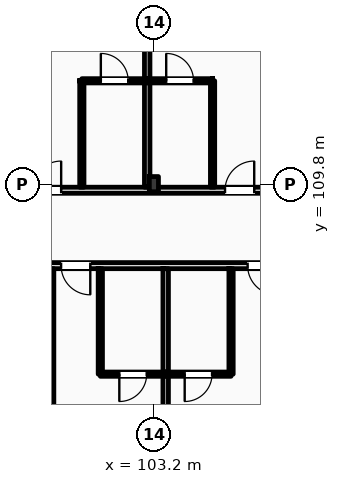
"""IFC4 building model, lengths in metres.
Left out: names, types, materials, properties, quantities, classifications, styles, units other than length and angle.
Written with IfcOpenShell. Run it as: python <this file> out.ifc"""

import sys

from ifc_helpers import new_model, si_unit, direction, frame, frame_2d, origin, origin_2d, place, context, subcontext, project, spatial, rectangle, i_section, extrude, element, fill, save


model = new_model("IFC4")
c1 = context("Model", 3, precision=1e-05, world=origin(), true_north=direction((0.0, 1.0)))
c2 = subcontext(c1, "Body", "Model", "MODEL_VIEW")
j1 = project(units=[si_unit("LENGTHUNIT", "METRE"), si_unit("PLANEANGLEUNIT", "RADIAN")], contexts=[c1])
p1 = place(None, origin())
s1 = spatial("IfcSite", under=j1, at=p1, CompositionType="ELEMENT")
p2 = place(p1, origin())
s2 = spatial("IfcBuilding", under=s1, at=p2, CompositionType="ELEMENT")
p3 = place(p2, frame((0.0, 0.0, 24.6)))
s3 = spatial("IfcBuildingStorey", under=s2, at=p3, CompositionType="ELEMENT", Elevation=24.6)
p4 = place(p3, frame((103.2, 109.8, 0.0), z_axis=(0.0, 0.0, 1.0), x_axis=(1.0, 0.0, 0.0)))
e1 = element("IfcColumn", 1, at=p4, inside=s3, PredefinedType="COLUMN", context=c2, shape_type="SweptSolid", body=[
    extrude(i_section(OverallWidth=0.3, OverallDepth=0.5, WebThickness=0.014, FlangeThickness=0.028, FilletRadius=0.027, at=origin_2d()), origin(), (0.0, 0.0, 1.0), 3.6),
])
p5 = place(p3, frame((10.65, 109.6, 0.0), z_axis=(0.0, 0.0, 1.0), x_axis=(1.0, 0.0, 0.0)))
e2 = element("IfcWall", 2, at=p5, inside=s3, PredefinedType="PARTITIONING", context=c2, shape_type="SweptSolid", body=[
    extrude(rectangle(XDim=109.21, YDim=0.2, at=frame_2d((54.605, 0.0))), origin(), (0.0, 0.0, 1.0), 2.78),
])
p6 = place(p5, frame((12.705, 0.0, 0.0)))
e3 = element("IfcOpeningElement", 3, at=p6, cuts=e2, PredefinedType="OPENING", context=c2, shape_type="SweptSolid", body=[
    extrude(rectangle(XDim=1.02, YDim=2.2, at=frame_2d((0.51, 1.1))), frame((0.0, 0.11, 0.0), z_axis=(0.0, -1.0, 0.0), x_axis=(1.0, 0.0, 0.0)), (0.0, 0.0, 1.0), 0.22),
])
p7 = place(p5, frame((19.26, 0.0, 0.0)))
e4 = element("IfcOpeningElement", 4, at=p7, cuts=e2, PredefinedType="OPENING", context=c2, shape_type="SweptSolid", body=[
    extrude(rectangle(XDim=1.02, YDim=2.2, at=frame_2d((0.51, 1.1))), frame((0.0, 0.11, 0.0), z_axis=(0.0, -1.0, 0.0), x_axis=(1.0, 0.0, 0.0)), (0.0, 0.0, 1.0), 0.22),
])
p8 = place(p5, frame((23.71, 0.0, 0.0)))
e5 = element("IfcOpeningElement", 5, at=p8, cuts=e2, PredefinedType="OPENING", context=c2, shape_type="SweptSolid", body=[
    extrude(rectangle(XDim=1.02, YDim=2.2, at=frame_2d((0.51, 1.1))), frame((0.0, 0.11, 0.0), z_axis=(0.0, -1.0, 0.0), x_axis=(1.0, 0.0, 0.0)), (0.0, 0.0, 1.0), 0.22),
])
p9 = place(p5, frame((27.66, 0.0, 0.0)))
e6 = element("IfcOpeningElement", 6, at=p9, cuts=e2, PredefinedType="OPENING", context=c2, shape_type="SweptSolid", body=[
    extrude(rectangle(XDim=1.02, YDim=2.2, at=frame_2d((0.51, 1.1))), frame((0.0, 0.11, 0.0), z_axis=(0.0, -1.0, 0.0), x_axis=(1.0, 0.0, 0.0)), (0.0, 0.0, 1.0), 0.22),
])
p10 = place(p5, frame((31.89, 0.0, 0.0)))
e7 = element("IfcOpeningElement", 7, at=p10, cuts=e2, PredefinedType="OPENING", context=c2, shape_type="SweptSolid", body=[
    extrude(rectangle(XDim=0.96, YDim=2.2, at=frame_2d((0.48, 1.1))), frame((0.0, 0.11, 0.0), z_axis=(0.0, -1.0, 0.0), x_axis=(1.0, 0.0, 0.0)), (0.0, 0.0, 1.0), 0.22),
])
p11 = place(p5, frame((33.94, 0.0, 0.0)))
e8 = element("IfcOpeningElement", 8, at=p11, cuts=e2, PredefinedType="OPENING", context=c2, shape_type="SweptSolid", body=[
    extrude(rectangle(XDim=0.96, YDim=2.2, at=frame_2d((0.48, 1.1))), frame((0.0, 0.11, 0.0), z_axis=(0.0, -1.0, 0.0), x_axis=(1.0, 0.0, 0.0)), (0.0, 0.0, 1.0), 0.22),
])
p12 = place(p5, frame((40.29, 0.0, 0.0)))
e9 = element("IfcOpeningElement", 9, at=p12, cuts=e2, PredefinedType="OPENING", context=c2, shape_type="SweptSolid", body=[
    extrude(rectangle(XDim=0.96, YDim=2.2, at=frame_2d((0.48, 1.1))), frame((0.0, 0.11, 0.0), z_axis=(0.0, -1.0, 0.0), x_axis=(1.0, 0.0, 0.0)), (0.0, 0.0, 1.0), 0.22),
])
p13 = place(p5, frame((42.34, 0.0, 0.0)))
e10 = element("IfcOpeningElement", 10, at=p13, cuts=e2, PredefinedType="OPENING", context=c2, shape_type="SweptSolid", body=[
    extrude(rectangle(XDim=0.96, YDim=2.2, at=frame_2d((0.48, 1.1))), frame((0.0, 0.11, 0.0), z_axis=(0.0, -1.0, 0.0), x_axis=(1.0, 0.0, 0.0)), (0.0, 0.0, 1.0), 0.22),
])
p14 = place(p5, frame((48.69, 0.0, 0.0)))
e11 = element("IfcOpeningElement", 11, at=p14, cuts=e2, PredefinedType="OPENING", context=c2, shape_type="SweptSolid", body=[
    extrude(rectangle(XDim=0.96, YDim=2.2, at=frame_2d((0.48, 1.1))), frame((0.0, 0.11, 0.0), z_axis=(0.0, -1.0, 0.0), x_axis=(1.0, 0.0, 0.0)), (0.0, 0.0, 1.0), 0.22),
])
p15 = place(p5, frame((50.74, 0.0, 0.0)))
e12 = element("IfcOpeningElement", 12, at=p15, cuts=e2, PredefinedType="OPENING", context=c2, shape_type="SweptSolid", body=[
    extrude(rectangle(XDim=0.96, YDim=2.2, at=frame_2d((0.48, 1.1))), frame((0.0, 0.11, 0.0), z_axis=(0.0, -1.0, 0.0), x_axis=(1.0, 0.0, 0.0)), (0.0, 0.0, 1.0), 0.22),
])
p16 = place(p5, frame((57.09, 0.0, 0.0)))
e13 = element("IfcOpeningElement", 13, at=p16, cuts=e2, PredefinedType="OPENING", context=c2, shape_type="SweptSolid", body=[
    extrude(rectangle(XDim=0.96, YDim=2.2, at=frame_2d((0.48, 1.1))), frame((0.0, 0.11, 0.0), z_axis=(0.0, -1.0, 0.0), x_axis=(1.0, 0.0, 0.0)), (0.0, 0.0, 1.0), 0.22),
])
p17 = place(p5, frame((59.14, 0.0, 0.0)))
e14 = element("IfcOpeningElement", 14, at=p17, cuts=e2, PredefinedType="OPENING", context=c2, shape_type="SweptSolid", body=[
    extrude(rectangle(XDim=0.96, YDim=2.2, at=frame_2d((0.48, 1.1))), frame((0.0, 0.11, 0.0), z_axis=(0.0, -1.0, 0.0), x_axis=(1.0, 0.0, 0.0)), (0.0, 0.0, 1.0), 0.22),
])
p18 = place(p5, frame((65.49, 0.0, 0.0)))
e15 = element("IfcOpeningElement", 15, at=p18, cuts=e2, PredefinedType="OPENING", context=c2, shape_type="SweptSolid", body=[
    extrude(rectangle(XDim=0.96, YDim=2.2, at=frame_2d((0.48, 1.1))), frame((0.0, 0.11, 0.0), z_axis=(0.0, -1.0, 0.0), x_axis=(1.0, 0.0, 0.0)), (0.0, 0.0, 1.0), 0.22),
])
p19 = place(p5, frame((67.54, 0.0, 0.0)))
e16 = element("IfcOpeningElement", 16, at=p19, cuts=e2, PredefinedType="OPENING", context=c2, shape_type="SweptSolid", body=[
    extrude(rectangle(XDim=0.96, YDim=2.2, at=frame_2d((0.48, 1.1))), frame((0.0, 0.11, 0.0), z_axis=(0.0, -1.0, 0.0), x_axis=(1.0, 0.0, 0.0)), (0.0, 0.0, 1.0), 0.22),
])
p20 = place(p5, frame((73.89, 0.0, 0.0)))
e17 = element("IfcOpeningElement", 17, at=p20, cuts=e2, PredefinedType="OPENING", context=c2, shape_type="SweptSolid", body=[
    extrude(rectangle(XDim=0.96, YDim=2.2, at=frame_2d((0.48, 1.1))), frame((0.0, 0.11, 0.0), z_axis=(0.0, -1.0, 0.0), x_axis=(1.0, 0.0, 0.0)), (0.0, 0.0, 1.0), 0.22),
])
p21 = place(p5, frame((78.09, 0.0, 0.0)))
e18 = element("IfcOpeningElement", 18, at=p21, cuts=e2, PredefinedType="OPENING", context=c2, shape_type="SweptSolid", body=[
    extrude(rectangle(XDim=0.96, YDim=2.2, at=frame_2d((0.48, 1.1))), frame((0.0, 0.11, 0.0), z_axis=(0.0, -1.0, 0.0), x_axis=(1.0, 0.0, 0.0)), (0.0, 0.0, 1.0), 0.22),
])
p22 = place(p5, frame((82.29, 0.0, 0.0)))
e19 = element("IfcOpeningElement", 19, at=p22, cuts=e2, PredefinedType="OPENING", context=c2, shape_type="SweptSolid", body=[
    extrude(rectangle(XDim=0.96, YDim=2.2, at=frame_2d((0.48, 1.1))), frame((0.0, 0.11, 0.0), z_axis=(0.0, -1.0, 0.0), x_axis=(1.0, 0.0, 0.0)), (0.0, 0.0, 1.0), 0.22),
])
p23 = place(p5, frame((86.49, 0.0, 0.0)))
e20 = element("IfcOpeningElement", 20, at=p23, cuts=e2, PredefinedType="OPENING", context=c2, shape_type="SweptSolid", body=[
    extrude(rectangle(XDim=0.96, YDim=2.2, at=frame_2d((0.48, 1.1))), frame((0.0, 0.11, 0.0), z_axis=(0.0, -1.0, 0.0), x_axis=(1.0, 0.0, 0.0)), (0.0, 0.0, 1.0), 0.22),
])
p24 = place(p5, frame((88.54, 0.0, 0.0)))
e21 = element("IfcOpeningElement", 21, at=p24, cuts=e2, PredefinedType="OPENING", context=c2, shape_type="SweptSolid", body=[
    extrude(rectangle(XDim=0.96, YDim=2.2, at=frame_2d((0.48, 1.1))), frame((0.0, 0.11, 0.0), z_axis=(0.0, -1.0, 0.0), x_axis=(1.0, 0.0, 0.0)), (0.0, 0.0, 1.0), 0.22),
])
p25 = place(p5, frame((94.89, 0.0, 0.0)))
e22 = element("IfcOpeningElement", 22, at=p25, cuts=e2, PredefinedType="OPENING", context=c2, shape_type="SweptSolid", body=[
    extrude(rectangle(XDim=0.96, YDim=2.2, at=frame_2d((0.48, 1.1))), frame((0.0, 0.11, 0.0), z_axis=(0.0, -1.0, 0.0), x_axis=(1.0, 0.0, 0.0)), (0.0, 0.0, 1.0), 0.22),
])
p26 = place(p5, frame((96.94, 0.0, 0.0)))
e23 = element("IfcOpeningElement", 23, at=p26, cuts=e2, PredefinedType="OPENING", context=c2, shape_type="SweptSolid", body=[
    extrude(rectangle(XDim=0.96, YDim=2.2, at=frame_2d((0.48, 1.1))), frame((0.0, 0.11, 0.0), z_axis=(0.0, -1.0, 0.0), x_axis=(1.0, 0.0, 0.0)), (0.0, 0.0, 1.0), 0.22),
])
p27 = place(p5, frame((103.29, 0.0, 0.0)))
e24 = element("IfcOpeningElement", 24, at=p27, cuts=e2, PredefinedType="OPENING", context=c2, shape_type="SweptSolid", body=[
    extrude(rectangle(XDim=0.96, YDim=2.2, at=frame_2d((0.48, 1.1))), frame((0.0, 0.11, 0.0), z_axis=(0.0, -1.0, 0.0), x_axis=(1.0, 0.0, 0.0)), (0.0, 0.0, 1.0), 0.22),
])
p28 = place(p5, frame((105.25, 0.0, 0.0)))
e25 = element("IfcOpeningElement", 25, at=p28, cuts=e2, PredefinedType="OPENING", context=c2, shape_type="SweptSolid", body=[
    extrude(rectangle(XDim=0.96, YDim=2.2, at=frame_2d((0.48, 1.1))), frame((0.0, 0.11, 0.0), z_axis=(0.0, -1.0, 0.0), x_axis=(1.0, 0.0, 0.0)), (0.0, 0.0, 1.0), 0.22),
])
p29 = place(p5, frame((2.716, 0.0, 0.0)))
e26 = element("IfcOpeningElement", 26, at=p29, cuts=e2, PredefinedType="OPENING", context=c2, shape_type="SweptSolid", body=[
    extrude(rectangle(XDim=1.35, YDim=2.25, at=frame_2d((0.675, 1.125))), frame((0.0, 0.11, 0.0), z_axis=(0.0, -1.0, 0.0), x_axis=(1.0, 0.0, 0.0)), (0.0, 0.0, 1.0), 0.22),
])
p30 = place(p5, frame((6.65, 0.0, 0.0)))
e27 = element("IfcOpeningElement", 27, at=p30, cuts=e2, PredefinedType="OPENING", context=c2, shape_type="SweptSolid", body=[
    extrude(rectangle(XDim=1.35, YDim=2.25, at=frame_2d((0.675, 1.125))), frame((0.0, 0.11, 0.0), z_axis=(0.0, -1.0, 0.0), x_axis=(1.0, 0.0, 0.0)), (0.0, 0.0, 1.0), 0.22),
])
p31 = place(p5, frame((10.583, 0.0, 0.0)))
e28 = element("IfcOpeningElement", 28, at=p31, cuts=e2, PredefinedType="OPENING", context=c2, shape_type="SweptSolid", body=[
    extrude(rectangle(XDim=1.35, YDim=2.25, at=frame_2d((0.675, 1.125))), frame((0.0, 0.11, 0.0), z_axis=(0.0, -1.0, 0.0), x_axis=(1.0, 0.0, 0.0)), (0.0, 0.0, 1.0), 0.22),
])
p32 = place(p3, frame((79.76, 107.12, 0.0), z_axis=(0.0, 0.0, 1.0), x_axis=(1.0, 0.0, 0.0)))
e29 = element("IfcWall", 29, at=p32, inside=s3, PredefinedType="PARTITIONING", context=c2, shape_type="SweptSolid", body=[
    extrude(rectangle(XDim=40.1, YDim=0.2, at=frame_2d((20.05, 0.0))), origin(), (0.0, 0.0, 1.0), 3.34),
])
p33 = place(p32, frame((2.65, 0.0, 0.0)))
e30 = element("IfcOpeningElement", 30, at=p33, cuts=e29, PredefinedType="OPENING", context=c2, shape_type="SweptSolid", body=[
    extrude(rectangle(XDim=0.96, YDim=2.2, at=frame_2d((0.48, 1.1))), frame((0.0, 0.11, 0.0), z_axis=(0.0, -1.0, 0.0), x_axis=(1.0, 0.0, 0.0)), (0.0, 0.0, 1.0), 0.22),
])
p34 = place(p32, frame((4.448, 0.0, 0.0)))
e31 = element("IfcOpeningElement", 31, at=p34, cuts=e29, PredefinedType="OPENING", context=c2, shape_type="SweptSolid", body=[
    extrude(rectangle(XDim=0.96, YDim=2.2, at=frame_2d((0.48, 1.1))), frame((0.0, 0.11, 0.0), z_axis=(0.0, -1.0, 0.0), x_axis=(1.0, 0.0, 0.0)), (0.0, 0.0, 1.0), 0.22),
])
p35 = place(p32, frame((10.583, 0.0, 0.0)))
e32 = element("IfcOpeningElement", 32, at=p35, cuts=e29, PredefinedType="OPENING", context=c2, shape_type="SweptSolid", body=[
    extrude(rectangle(XDim=0.96, YDim=2.2, at=frame_2d((0.48, 1.1))), frame((0.0, 0.11, 0.0), z_axis=(0.0, -1.0, 0.0), x_axis=(1.0, 0.0, 0.0)), (0.0, 0.0, 1.0), 0.22),
])
p36 = place(p32, frame((12.418, 0.0, 0.0)))
e33 = element("IfcOpeningElement", 33, at=p36, cuts=e29, PredefinedType="OPENING", context=c2, shape_type="SweptSolid", body=[
    extrude(rectangle(XDim=0.96, YDim=2.2, at=frame_2d((0.48, 1.1))), frame((0.0, 0.11, 0.0), z_axis=(0.0, -1.0, 0.0), x_axis=(1.0, 0.0, 0.0)), (0.0, 0.0, 1.0), 0.22),
])
p37 = place(p32, frame((18.553, 0.0, 0.0)))
e34 = element("IfcOpeningElement", 34, at=p37, cuts=e29, PredefinedType="OPENING", context=c2, shape_type="SweptSolid", body=[
    extrude(rectangle(XDim=0.96, YDim=2.2, at=frame_2d((0.48, 1.1))), frame((0.0, 0.11, 0.0), z_axis=(0.0, -1.0, 0.0), x_axis=(1.0, 0.0, 0.0)), (0.0, 0.0, 1.0), 0.22),
])
p38 = place(p32, frame((20.388, 0.0, 0.0)))
e35 = element("IfcOpeningElement", 35, at=p38, cuts=e29, PredefinedType="OPENING", context=c2, shape_type="SweptSolid", body=[
    extrude(rectangle(XDim=0.96, YDim=2.2, at=frame_2d((0.48, 1.1))), frame((0.0, 0.11, 0.0), z_axis=(0.0, -1.0, 0.0), x_axis=(1.0, 0.0, 0.0)), (0.0, 0.0, 1.0), 0.22),
])
p39 = place(p32, frame((26.523, 0.0, 0.0)))
e36 = element("IfcOpeningElement", 36, at=p39, cuts=e29, PredefinedType="OPENING", context=c2, shape_type="SweptSolid", body=[
    extrude(rectangle(XDim=0.96, YDim=2.2, at=frame_2d((0.48, 1.1))), frame((0.0, 0.11, 0.0), z_axis=(0.0, -1.0, 0.0), x_axis=(1.0, 0.0, 0.0)), (0.0, 0.0, 1.0), 0.22),
])
p40 = place(p32, frame((28.358, 0.0, 0.0)))
e37 = element("IfcOpeningElement", 37, at=p40, cuts=e29, PredefinedType="OPENING", context=c2, shape_type="SweptSolid", body=[
    extrude(rectangle(XDim=0.96, YDim=2.2, at=frame_2d((0.48, 1.1))), frame((0.0, 0.11, 0.0), z_axis=(0.0, -1.0, 0.0), x_axis=(1.0, 0.0, 0.0)), (0.0, 0.0, 1.0), 0.22),
])
p41 = place(p32, frame((34.493, 0.0, 0.0)))
e38 = element("IfcOpeningElement", 38, at=p41, cuts=e29, PredefinedType="OPENING", context=c2, shape_type="SweptSolid", body=[
    extrude(rectangle(XDim=0.96, YDim=2.2, at=frame_2d((0.48, 1.1))), frame((0.0, 0.11, 0.0), z_axis=(0.0, -1.0, 0.0), x_axis=(1.0, 0.0, 0.0)), (0.0, 0.0, 1.0), 0.22),
])
p42 = place(p32, frame((36.364, 0.0, 0.0)))
e39 = element("IfcOpeningElement", 39, at=p42, cuts=e29, PredefinedType="OPENING", context=c2, shape_type="SweptSolid", body=[
    extrude(rectangle(XDim=0.96, YDim=2.2, at=frame_2d((0.48, 1.1))), frame((0.0, 0.11, 0.0), z_axis=(0.0, -1.0, 0.0), x_axis=(1.0, 0.0, 0.0)), (0.0, 0.0, 1.0), 0.22),
])
p43 = place(p3, frame((102.98, 109.7, 0.0), z_axis=(0.0, 0.0, 1.0), x_axis=(0.0, 1.0, 0.0)))
e40 = element("IfcWall", 40, at=p43, inside=s3, PredefinedType="PARTITIONING", context=c2, shape_type="SweptSolid", body=[
    extrude(rectangle(XDim=8.15, YDim=0.18, at=frame_2d((4.075, 0.0))), origin(), (0.0, 0.0, 1.0), 2.93),
])
p44 = place(p3, frame((100.83, 109.7, 0.0), z_axis=(0.0, 0.0, 1.0), x_axis=(0.0, 1.0, 0.0)))
e41 = element("IfcWall", 41, at=p44, inside=s3, PredefinedType="PARTITIONING", context=c2, shape_type="SweptSolid", body=[
    extrude(rectangle(XDim=3.5, YDim=0.14, at=frame_2d((1.75, 0.0))), origin(), (0.0, 0.0, 1.0), 3.34),
])
p45 = place(p3, frame((100.83, 113.2, 0.0), z_axis=(0.0, 0.0, 1.0), x_axis=(1.0, 0.0, 0.0)))
e42 = element("IfcWall", 42, at=p45, inside=s3, PredefinedType="PARTITIONING", context=c2, shape_type="SweptSolid", body=[
    extrude(rectangle(XDim=2.15, YDim=0.14, at=frame_2d((1.075, 0.0))), origin(), (0.0, 0.0, 1.0), 3.34),
])
p46 = place(p45, frame((0.625, 0.0, 0.0)))
e43 = element("IfcOpeningElement", 43, at=p46, cuts=e42, PredefinedType="OPENING", context=c2, shape_type="SweptSolid", body=[
    extrude(rectangle(XDim=0.9, YDim=2.1, at=frame_2d((0.45, 1.05))), frame((0.0, 0.08, 0.0), z_axis=(0.0, -1.0, 0.0), x_axis=(1.0, 0.0, 0.0)), (0.0, 0.0, 1.0), 0.16),
])
p47 = place(p3, frame((105.13, 109.7, 0.0), z_axis=(0.0, 0.0, 1.0), x_axis=(0.0, 1.0, 0.0)))
e44 = element("IfcWall", 44, at=p47, inside=s3, PredefinedType="PARTITIONING", context=c2, shape_type="SweptSolid", body=[
    extrude(rectangle(XDim=3.5, YDim=0.14, at=frame_2d((1.75, 0.0))), origin(), (0.0, 0.0, 1.0), 3.34),
])
p48 = place(p3, frame((102.98, 113.2, 0.0), z_axis=(0.0, 0.0, 1.0), x_axis=(1.0, 0.0, 0.0)))
e45 = element("IfcWall", 45, at=p48, inside=s3, PredefinedType="PARTITIONING", context=c2, shape_type="SweptSolid", body=[
    extrude(rectangle(XDim=2.15, YDim=0.14, at=frame_2d((1.075, 0.0))), origin(), (0.0, 0.0, 1.0), 3.34),
])
p49 = place(p48, frame((0.625, 0.0, 0.0)))
e46 = element("IfcOpeningElement", 46, at=p49, cuts=e45, PredefinedType="OPENING", context=c2, shape_type="SweptSolid", body=[
    extrude(rectangle(XDim=0.9, YDim=2.1, at=frame_2d((0.45, 1.05))), frame((0.0, 0.08, 0.0), z_axis=(0.0, -1.0, 0.0), x_axis=(1.0, 0.0, 0.0)), (0.0, 0.0, 1.0), 0.16),
])
for number, where, z_axis, x_axis in (
    (47, (99.819, 96.14, 0.0), (0.0, 0.0, 1.0), (0.0, 1.0, 0.0)),
    (48, (103.588, 96.14, 0.0), (0.0, 0.0, 1.0), (0.0, 1.0, 0.0)),
):
    element("IfcWall", number, at=place(p3, frame(where, z_axis=z_axis, x_axis=x_axis)), inside=s3, PredefinedType="PARTITIONING", context=c2, shape_type="SweptSolid", body=[
        extrude(rectangle(XDim=10.88, YDim=0.18, at=frame_2d((5.44, 0.0))), origin(), (0.0, 0.0, 1.0), 3.34),
    ])
p50 = place(p3, frame((101.438, 103.55, 0.0), z_axis=(0.0, 0.0, 1.0), x_axis=(0.0, 1.0, 0.0)))
e49 = element("IfcWall", 49, at=p50, inside=s3, PredefinedType="PARTITIONING", context=c2, shape_type="SweptSolid", body=[
    extrude(rectangle(XDim=3.47, YDim=0.14, at=frame_2d((1.735, 0.0))), origin(), (0.0, 0.0, 1.0), 3.34),
])
p51 = place(p3, frame((101.438, 103.55, 0.0), z_axis=(0.0, 0.0, 1.0), x_axis=(1.0, 0.0, 0.0)))
e50 = element("IfcWall", 50, at=p51, inside=s3, PredefinedType="PARTITIONING", context=c2, shape_type="SweptSolid", body=[
    extrude(rectangle(XDim=2.15, YDim=0.14, at=frame_2d((1.075, 0.0))), origin(), (0.0, 0.0, 1.0), 3.34),
])
p52 = place(p51, frame((0.625, 0.0, 0.0)))
e51 = element("IfcOpeningElement", 51, at=p52, cuts=e50, PredefinedType="OPENING", context=c2, shape_type="SweptSolid", body=[
    extrude(rectangle(XDim=0.9, YDim=2.1, at=frame_2d((0.45, 1.05))), frame((0.0, 0.08, 0.0), z_axis=(0.0, -1.0, 0.0), x_axis=(1.0, 0.0, 0.0)), (0.0, 0.0, 1.0), 0.16),
])
p53 = place(p3, frame((105.738, 103.55, 0.0), z_axis=(0.0, 0.0, 1.0), x_axis=(0.0, 1.0, 0.0)))
e52 = element("IfcWall", 52, at=p53, inside=s3, PredefinedType="PARTITIONING", context=c2, shape_type="SweptSolid", body=[
    extrude(rectangle(XDim=3.47, YDim=0.14, at=frame_2d((1.735, 0.0))), origin(), (0.0, 0.0, 1.0), 3.34),
])
p54 = place(p3, frame((103.588, 103.55, 0.0), z_axis=(0.0, 0.0, 1.0), x_axis=(1.0, 0.0, 0.0)))
e53 = element("IfcWall", 53, at=p54, inside=s3, PredefinedType="PARTITIONING", context=c2, shape_type="SweptSolid", body=[
    extrude(rectangle(XDim=2.15, YDim=0.14, at=frame_2d((1.075, 0.0))), origin(), (0.0, 0.0, 1.0), 3.34),
])
p55 = place(p54, frame((0.625, 0.0, 0.0)))
e54 = element("IfcOpeningElement", 54, at=p55, cuts=e53, PredefinedType="OPENING", context=c2, shape_type="SweptSolid", body=[
    extrude(rectangle(XDim=0.9, YDim=2.1, at=frame_2d((0.45, 1.05))), frame((0.0, 0.08, 0.0), z_axis=(0.0, -1.0, 0.0), x_axis=(1.0, 0.0, 0.0)), (0.0, 0.0, 1.0), 0.16),
])
p56 = place(p24, origin())
e55 = element("IfcDoor", 55, at=p56, inside=s3, OperationType="SINGLE_SWING_RIGHT", PredefinedType="DOOR", context=c2, shape_type="SweptSolid", body=[
    extrude(rectangle(XDim=0.96, YDim=2.2, at=frame_2d((0.48, 1.1))), frame((0.0, 0.025, 0.0), z_axis=(0.0, -1.0, 0.0), x_axis=(1.0, 0.0, 0.0)), (0.0, 0.0, 1.0), 0.05),
])
fill(e21, e55)
p57 = place(p46, origin())
e56 = element("IfcDoor", 56, at=p57, inside=s3, OperationType="SINGLE_SWING_LEFT", PredefinedType="DOOR", context=c2, shape_type="SweptSolid", body=[
    extrude(rectangle(XDim=0.9, YDim=2.1, at=frame_2d((0.45, 1.05))), frame((0.0, 0.025, 0.0), z_axis=(0.0, -1.0, 0.0), x_axis=(1.0, 0.0, 0.0)), (0.0, 0.0, 1.0), 0.05),
])
fill(e43, e56)
p58 = place(p25, origin())
e57 = element("IfcDoor", 57, at=p58, inside=s3, OperationType="SINGLE_SWING_RIGHT", PredefinedType="DOOR", context=c2, shape_type="SweptSolid", body=[
    extrude(rectangle(XDim=0.96, YDim=2.2, at=frame_2d((0.48, 1.1))), frame((0.0, 0.025, 0.0), z_axis=(0.0, -1.0, 0.0), x_axis=(1.0, 0.0, 0.0)), (0.0, 0.0, 1.0), 0.05),
])
fill(e22, e57)
p59 = place(p49, origin())
e58 = element("IfcDoor", 58, at=p59, inside=s3, OperationType="SINGLE_SWING_LEFT", PredefinedType="DOOR", context=c2, shape_type="SweptSolid", body=[
    extrude(rectangle(XDim=0.9, YDim=2.1, at=frame_2d((0.45, 1.05))), frame((0.0, 0.025, 0.0), z_axis=(0.0, -1.0, 0.0), x_axis=(1.0, 0.0, 0.0)), (0.0, 0.0, 1.0), 0.05),
])
fill(e46, e58)
p60 = place(p38, frame((0.96, 0.0, 0.0), z_axis=(0.0, 0.0, 1.0), x_axis=(-1.0, 0.0, 0.0)))
e59 = element("IfcDoor", 59, at=p60, inside=s3, OperationType="SINGLE_SWING_RIGHT", PredefinedType="DOOR", context=c2, shape_type="SweptSolid", body=[
    extrude(rectangle(XDim=0.96, YDim=2.2, at=frame_2d((0.48, 1.1))), frame((0.0, 0.025, 0.0), z_axis=(0.0, -1.0, 0.0), x_axis=(1.0, 0.0, 0.0)), (0.0, 0.0, 1.0), 0.05),
])
fill(e35, e59)
p61 = place(p52, frame((0.9, 0.0, 0.0), z_axis=(0.0, 0.0, 1.0), x_axis=(-1.0, 0.0, 0.0)))
e60 = element("IfcDoor", 60, at=p61, inside=s3, OperationType="SINGLE_SWING_LEFT", PredefinedType="DOOR", context=c2, shape_type="SweptSolid", body=[
    extrude(rectangle(XDim=0.9, YDim=2.1, at=frame_2d((0.45, 1.05))), frame((0.0, 0.025, 0.0), z_axis=(0.0, -1.0, 0.0), x_axis=(1.0, 0.0, 0.0)), (0.0, 0.0, 1.0), 0.05),
])
fill(e51, e60)
p62 = place(p39, frame((0.96, 0.0, 0.0), z_axis=(0.0, 0.0, 1.0), x_axis=(-1.0, 0.0, 0.0)))
e61 = element("IfcDoor", 61, at=p62, inside=s3, OperationType="SINGLE_SWING_RIGHT", PredefinedType="DOOR", context=c2, shape_type="SweptSolid", body=[
    extrude(rectangle(XDim=0.96, YDim=2.2, at=frame_2d((0.48, 1.1))), frame((0.0, 0.025, 0.0), z_axis=(0.0, -1.0, 0.0), x_axis=(1.0, 0.0, 0.0)), (0.0, 0.0, 1.0), 0.05),
])
fill(e36, e61)
p63 = place(p55, frame((0.9, 0.0, 0.0), z_axis=(0.0, 0.0, 1.0), x_axis=(-1.0, 0.0, 0.0)))
e62 = element("IfcDoor", 62, at=p63, inside=s3, OperationType="SINGLE_SWING_LEFT", PredefinedType="DOOR", context=c2, shape_type="SweptSolid", body=[
    extrude(rectangle(XDim=0.9, YDim=2.1, at=frame_2d((0.45, 1.05))), frame((0.0, 0.025, 0.0), z_axis=(0.0, -1.0, 0.0), x_axis=(1.0, 0.0, 0.0)), (0.0, 0.0, 1.0), 0.05),
])
fill(e54, e62)
save(model, sys.argv[1])
